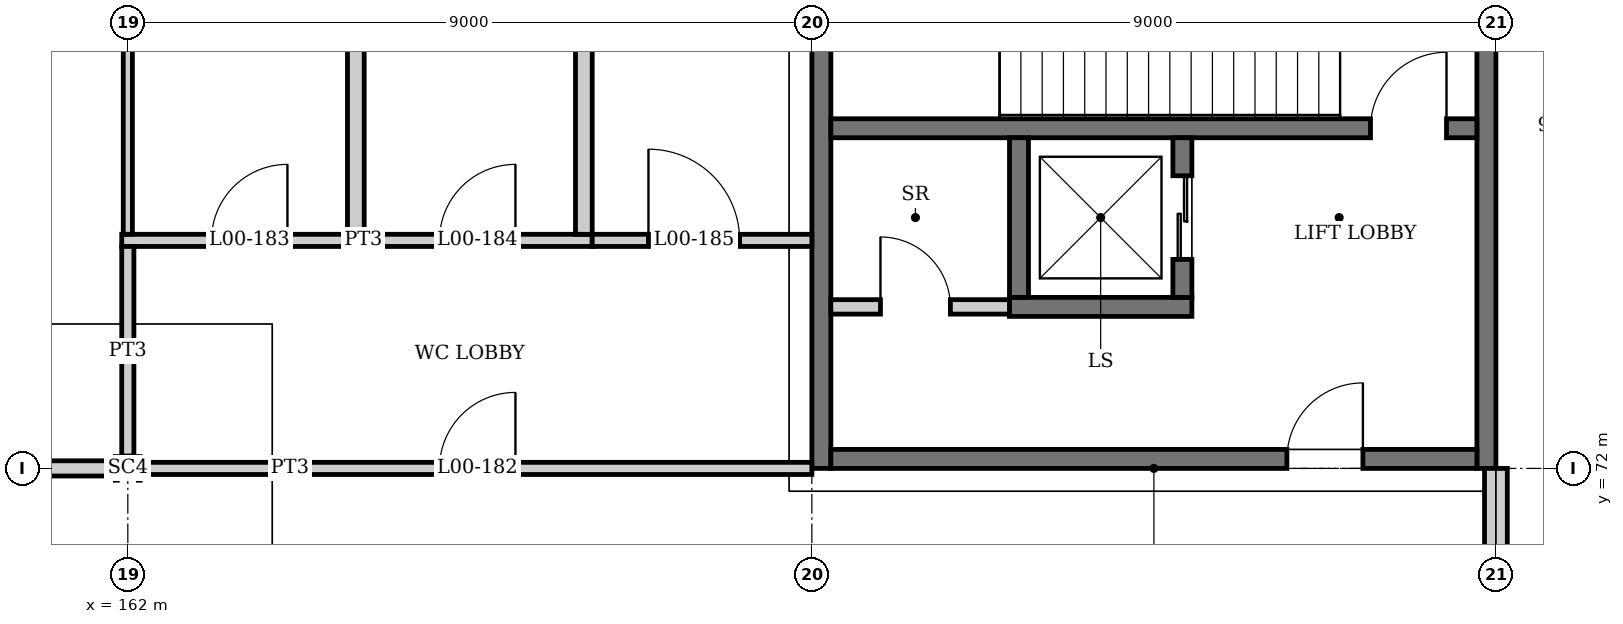
"""IFC4 building model, lengths in metres.
Left out: names, types, materials, properties, quantities, classifications, styles, units other than length and angle.
Written with IfcOpenShell. Run it as: python <this file> out.ifc"""

import sys

from ifc_helpers import new_model, si_unit, direction, frame, frame_2d, origin, origin_2d, place, context, subcontext, project, spatial, rectangle, i_section, extrude, element, fill, save


model = new_model("IFC4")
c1 = context("Model", 3, precision=1e-05, world=origin(), true_north=direction((0.0, 1.0)))
c2 = subcontext(c1, "Body", "Model", "MODEL_VIEW")
j1 = project(units=[si_unit("LENGTHUNIT", "METRE"), si_unit("PLANEANGLEUNIT", "RADIAN")], contexts=[c1])
p1 = place(None, origin())
s1 = spatial("IfcSite", under=j1, at=p1, CompositionType="ELEMENT")
p2 = place(p1, origin())
s2 = spatial("IfcBuilding", under=s1, at=p2, CompositionType="ELEMENT")
p3 = place(p2, origin())
s3 = spatial("IfcBuildingStorey", under=s2, at=p3, CompositionType="ELEMENT", Elevation=0.0)
p4 = place(p3, frame((162.0, 72.0, 0.0), z_axis=(0.0, 0.0, 1.0), x_axis=(0.0, 1.0, 0.0)))
e1 = element("IfcColumn", 1, at=p4, inside=s3, PredefinedType="COLUMN", context=c2, shape_type="SweptSolid", body=[
    extrude(i_section(OverallWidth=0.311, OverallDepth=0.327, WebThickness=0.016, FlangeThickness=0.025, at=origin_2d()), origin(), (0.0, 0.0, 1.0), 6.0),
])
p5 = place(p3, frame((171.125, 72.0, 0.0), z_axis=(0.0, 0.0, 1.0), x_axis=(0.0, 1.0, 0.0)))
e2 = element("IfcWall", 2, at=p5, inside=s3, PredefinedType="SHEAR", context=c2, shape_type="SweptSolid", body=[
    extrude(rectangle(XDim=9.0, YDim=0.25, at=frame_2d((4.5, 0.0))), origin(), (0.0, 0.0, 1.0), 6.0),
])
p6 = place(p3, frame((179.875, 72.0, 0.0), z_axis=(0.0, 0.0, 1.0), x_axis=(0.0, 1.0, 0.0)))
e3 = element("IfcWall", 3, at=p6, inside=s3, PredefinedType="SHEAR", context=c2, shape_type="SweptSolid", body=[
    extrude(rectangle(XDim=9.0, YDim=0.25, at=frame_2d((4.5, 0.0))), origin(), (0.0, 0.0, 1.0), 6.0),
])
p7 = place(p6, frame((5.6, 0.0, 0.0)))
e4 = element("IfcOpeningElement", 4, at=p7, cuts=e3, PredefinedType="OPENING", context=c2, shape_type="SweptSolid", body=[
    extrude(rectangle(XDim=1.8, YDim=2.4, at=frame_2d((0.9, 1.2))), frame((0.0, 0.135, 0.0), z_axis=(0.0, -1.0, 0.0), x_axis=(1.0, 0.0, 0.0)), (0.0, 0.0, 1.0), 0.27),
])
p8 = place(p3, frame((171.25, 72.125, 0.0), z_axis=(0.0, 0.0, 1.0), x_axis=(1.0, 0.0, 0.0)))
e5 = element("IfcWall", 5, at=p8, inside=s3, PredefinedType="SHEAR", context=c2, shape_type="SweptSolid", body=[
    extrude(rectangle(XDim=8.5, YDim=0.25, at=frame_2d((4.25, 0.0))), origin(), (0.0, 0.0, 1.0), 6.0),
])
p9 = place(p8, frame((6.0, 0.0, 0.0)))
e6 = element("IfcOpeningElement", 6, at=p9, cuts=e5, PredefinedType="OPENING", context=c2, shape_type="SweptSolid", body=[
    extrude(rectangle(XDim=1.0, YDim=2.1, at=frame_2d((0.5, 1.05))), frame((0.0, 0.135, 0.0), z_axis=(0.0, -1.0, 0.0), x_axis=(1.0, 0.0, 0.0)), (0.0, 0.0, 1.0), 0.27),
])
p10 = place(p3, frame((180.0, 63.154, 0.0), z_axis=(0.0, 0.0, 1.0), x_axis=(0.0, 1.0, 0.0)))
e7 = element("IfcWall", 7, at=p10, inside=s3, PredefinedType="SOLIDWALL", context=c2, shape_type="SweptSolid", body=[
    extrude(rectangle(XDim=8.846, YDim=0.3, at=frame_2d((4.423, 0.0))), origin(), (0.0, 0.0, 1.0), 5.444),
])
p11 = place(p10, frame((1.046, 0.0, 1.2)))
e8 = element("IfcOpeningElement", 8, at=p11, cuts=e7, PredefinedType="OPENING", context=c2, shape_type="SweptSolid", body=[
    extrude(rectangle(XDim=2.1, YDim=1.2, at=frame_2d((1.05, 0.6))), frame((0.0, 0.16, 0.0), z_axis=(0.0, -1.0, 0.0), x_axis=(1.0, 0.0, 0.0)), (0.0, 0.0, 1.0), 0.32),
])
p12 = place(p10, frame((6.146, 0.0, 0.6)))
e9 = element("IfcOpeningElement", 9, at=p12, cuts=e7, PredefinedType="OPENING", context=c2, shape_type="SweptSolid", body=[
    extrude(rectangle(XDim=0.9, YDim=2.7, at=frame_2d((0.45, 1.35))), frame((0.0, 0.16, 0.0), z_axis=(0.0, -1.0, 0.0), x_axis=(1.0, 0.0, 0.0)), (0.0, 0.0, 1.0), 0.32),
])
p13 = place(p3, frame((179.75, 76.475, 0.0), z_axis=(0.0, 0.0, 1.0), x_axis=(-1.0, 0.0, 0.0)))
e10 = element("IfcWall", 10, at=p13, inside=s3, PredefinedType="SOLIDWALL", context=c2, shape_type="SweptSolid", body=[
    extrude(rectangle(XDim=8.5, YDim=0.25, at=frame_2d((4.25, 0.0))), origin(), (0.0, 0.0, 1.0), 5.75),
])
p14 = place(p13, frame((0.4, 0.0, 0.0)))
e11 = element("IfcOpeningElement", 11, at=p14, cuts=e10, PredefinedType="OPENING", context=c2, shape_type="SweptSolid", body=[
    extrude(rectangle(XDim=1.0, YDim=2.1, at=frame_2d((0.5, 1.05))), frame((0.0, 0.135, 0.0), z_axis=(0.0, -1.0, 0.0), x_axis=(1.0, 0.0, 0.0)), (0.0, 0.0, 1.0), 0.27),
])
p15 = place(p3, frame((173.6, 74.125, -1.4), z_axis=(0.0, 0.0, 1.0), x_axis=(1.0, 0.0, 0.0)))
e12 = element("IfcWall", 12, at=p15, inside=s3, PredefinedType="SOLIDWALL", context=c2, shape_type="SweptSolid", body=[
    extrude(rectangle(XDim=2.4, YDim=0.25, at=frame_2d((1.2, 0.0))), origin(), (0.0, 0.0, 1.0), 7.4),
])
p16 = place(p3, frame((173.725, 74.25, -1.4), z_axis=(0.0, 0.0, 1.0), x_axis=(0.0, 1.0, 0.0)))
e13 = element("IfcWall", 13, at=p16, inside=s3, PredefinedType="SOLIDWALL", context=c2, shape_type="SweptSolid", body=[
    extrude(rectangle(XDim=2.1, YDim=0.25, at=frame_2d((1.05, 0.0))), origin(), (0.0, 0.0, 1.0), 7.4),
])
p17 = place(p3, frame((175.875, 74.25, -1.4), z_axis=(0.0, 0.0, 1.0), x_axis=(0.0, 1.0, 0.0)))
e14 = element("IfcWall", 14, at=p17, inside=s3, PredefinedType="SOLIDWALL", context=c2, shape_type="SweptSolid", body=[
    extrude(rectangle(XDim=2.1, YDim=0.25, at=frame_2d((1.05, 0.0))), origin(), (0.0, 0.0, 1.0), 7.4),
])
p18 = place(p17, frame((0.5, 0.0, 1.4)))
e15 = element("IfcOpeningElement", 15, at=p18, cuts=e14, PredefinedType="OPENING", context=c2, shape_type="SweptSolid", body=[
    extrude(rectangle(XDim=1.1, YDim=2.1, at=frame_2d((0.55, 1.05))), frame((0.0, 0.135, 0.0), z_axis=(0.0, -1.0, 0.0), x_axis=(1.0, 0.0, 0.0)), (0.0, 0.0, 1.0), 0.27),
])
p19 = place(p3, frame((153.164, 72.0, 0.0), z_axis=(0.0, 0.0, 1.0), x_axis=(1.0, 0.0, 0.0)))
e16 = element("IfcWall", 16, at=p19, inside=s3, PredefinedType="PARTITIONING", context=c2, shape_type="SweptSolid", body=[
    extrude(rectangle(XDim=8.673, YDim=0.2, at=frame_2d((4.336, 0.0))), origin(), (0.0, 0.0, 1.0), 5.322),
])
p20 = place(p19, frame((3.937, 0.0, 0.0)))
e17 = element("IfcOpeningElement", 17, at=p20, cuts=e16, PredefinedType="OPENING", context=c2, shape_type="SweptSolid", body=[
    extrude(rectangle(XDim=1.0, YDim=2.1, at=frame_2d((0.5, 1.05))), frame((0.0, 0.11, 0.0), z_axis=(0.0, -1.0, 0.0), x_axis=(1.0, 0.0, 0.0)), (0.0, 0.0, 1.0), 0.22),
])
p21 = place(p3, frame((162.164, 72.0, 0.0), z_axis=(0.0, 0.0, 1.0), x_axis=(1.0, 0.0, 0.0)))
e18 = element("IfcWall", 18, at=p21, inside=s3, PredefinedType="PARTITIONING", context=c2, shape_type="SweptSolid", body=[
    extrude(rectangle(XDim=8.836, YDim=0.16, at=frame_2d((4.418, 0.0))), origin(), (0.0, 0.0, 1.0), 5.322),
])
p22 = place(p21, frame((3.937, 0.0, 0.0)))
e19 = element("IfcOpeningElement", 19, at=p22, cuts=e18, PredefinedType="OPENING", context=c2, shape_type="SweptSolid", body=[
    extrude(rectangle(XDim=1.0, YDim=2.1, at=frame_2d((0.5, 1.05))), frame((0.0, 0.09, 0.0), z_axis=(0.0, -1.0, 0.0), x_axis=(1.0, 0.0, 0.0)), (0.0, 0.0, 1.0), 0.18),
])
p23 = place(p3, frame((171.25, 74.125, 0.0), z_axis=(0.0, 0.0, 1.0), x_axis=(1.0, 0.0, 0.0)))
e20 = element("IfcWall", 20, at=p23, inside=s3, PredefinedType="PARTITIONING", context=c2, shape_type="SweptSolid", body=[
    extrude(rectangle(XDim=2.35, YDim=0.19, at=frame_2d((1.175, 0.0))), origin(), (0.0, 0.0, 1.0), 5.75),
])
p24 = place(p23, frame((0.653, 0.0, 0.0)))
e21 = element("IfcOpeningElement", 21, at=p24, cuts=e20, PredefinedType="OPENING", context=c2, shape_type="SweptSolid", body=[
    extrude(rectangle(XDim=0.92, YDim=2.1, at=frame_2d((0.46, 1.05))), frame((0.0, 0.105, 0.0), z_axis=(0.0, -1.0, 0.0), x_axis=(1.0, 0.0, 0.0)), (0.0, 0.0, 1.0), 0.21),
])
p25 = place(p3, frame((161.92, 75.0, 0.0), z_axis=(0.0, 0.0, 1.0), x_axis=(1.0, 0.0, 0.0)))
e22 = element("IfcWall", 22, at=p25, inside=s3, PredefinedType="PARTITIONING", context=c2, shape_type="SweptSolid", body=[
    extrude(rectangle(XDim=6.19, YDim=0.16, at=frame_2d((3.095, 0.0))), origin(), (0.0, 0.0, 1.0), 5.447),
])
p26 = place(p25, frame((1.18, 0.0, 0.0)))
e23 = element("IfcOpeningElement", 23, at=p26, cuts=e22, PredefinedType="OPENING", context=c2, shape_type="SweptSolid", body=[
    extrude(rectangle(XDim=1.0, YDim=2.1, at=frame_2d((0.5, 1.05))), frame((0.0, 0.09, 0.0), z_axis=(0.0, -1.0, 0.0), x_axis=(1.0, 0.0, 0.0)), (0.0, 0.0, 1.0), 0.18),
])
p27 = place(p25, frame((4.18, 0.0, 0.0)))
e24 = element("IfcOpeningElement", 24, at=p27, cuts=e22, PredefinedType="OPENING", context=c2, shape_type="SweptSolid", body=[
    extrude(rectangle(XDim=1.0, YDim=2.1, at=frame_2d((0.5, 1.05))), frame((0.0, 0.09, 0.0), z_axis=(0.0, -1.0, 0.0), x_axis=(1.0, 0.0, 0.0)), (0.0, 0.0, 1.0), 0.18),
])
p28 = place(p3, frame((168.11, 75.0, 0.0), z_axis=(0.0, 0.0, 1.0), x_axis=(1.0, 0.0, 0.0)))
e25 = element("IfcWall", 25, at=p28, inside=s3, PredefinedType="PARTITIONING", context=c2, shape_type="SweptSolid", body=[
    extrude(rectangle(XDim=2.89, YDim=0.16, at=frame_2d((1.445, 0.0))), origin(), (0.0, 0.0, 1.0), 5.85),
])
p29 = place(p28, frame((0.74, 0.0, 0.0)))
e26 = element("IfcOpeningElement", 26, at=p29, cuts=e25, PredefinedType="OPENING", context=c2, shape_type="SweptSolid", body=[
    extrude(rectangle(XDim=1.2, YDim=2.1, at=frame_2d((0.6, 1.05))), frame((0.0, 0.09, 0.0), z_axis=(0.0, -1.0, 0.0), x_axis=(1.0, 0.0, 0.0)), (0.0, 0.0, 1.0), 0.18),
])
p30 = place(p3, frame((162.0, 72.164, 0.0), z_axis=(0.0, 0.0, 1.0), x_axis=(0.0, 1.0, 0.0)))
e27 = element("IfcWall", 27, at=p30, inside=s3, PredefinedType="PARTITIONING", context=c2, shape_type="SweptSolid", body=[
    extrude(rectangle(XDim=2.756, YDim=0.16, at=frame_2d((1.378, 0.0))), origin(), (0.0, 0.0, 1.0), 5.447),
])
p31 = place(p3, frame((162.0, 75.08, 0.0), z_axis=(0.0, 0.0, 1.0), x_axis=(0.0, 1.0, 0.0)))
e28 = element("IfcWall", 28, at=p31, inside=s3, PredefinedType="PARTITIONING", context=c2, shape_type="SweptSolid", body=[
    extrude(rectangle(XDim=5.32, YDim=0.12, at=frame_2d((2.66, 0.0))), origin(), (0.0, 0.0, 1.0), 5.447),
])
for number, where, z_axis, x_axis in (
    (29, (165.0, 75.08, 0.0), (0.0, 0.0, 1.0), (0.0, 1.0, 0.0)),
    (30, (168.0, 75.08, 0.0), (0.0, 0.0, 1.0), (0.0, 1.0, 0.0)),
):
    element("IfcWall", number, at=place(p3, frame(where, z_axis=z_axis, x_axis=x_axis)), inside=s3, PredefinedType="PLUMBINGWALL", context=c2, shape_type="SweptSolid", body=[
        extrude(rectangle(XDim=5.32, YDim=0.22, at=frame_2d((2.66, 0.0))), origin(), (0.0, 0.0, 1.0), 5.85),
    ])
p32 = place(p18, origin())
e31 = element("IfcDoor", 31, at=p32, inside=s3, OperationType="DOUBLE_DOOR_SLIDING", PredefinedType="DOOR", context=c2, shape_type="SweptSolid", body=[
    extrude(rectangle(XDim=1.1, YDim=2.1, at=frame_2d((0.55, 1.05))), frame((0.0, 0.025, 0.0), z_axis=(0.0, -1.0, 0.0), x_axis=(1.0, 0.0, 0.0)), (0.0, 0.0, 1.0), 0.05),
])
fill(e15, e31)
p33 = place(p14, frame((1.0, 0.0, 0.0), z_axis=(0.0, 0.0, 1.0), x_axis=(-1.0, 0.0, 0.0)))
e32 = element("IfcDoor", 32, at=p33, inside=s3, OperationType="SINGLE_SWING_RIGHT", PredefinedType="DOOR", context=c2, shape_type="SweptSolid", body=[
    extrude(rectangle(XDim=1.0, YDim=2.1, at=frame_2d((0.5, 1.05))), frame((0.0, 0.025, 0.0), z_axis=(0.0, -1.0, 0.0), x_axis=(1.0, 0.0, 0.0)), (0.0, 0.0, 1.0), 0.05),
])
fill(e11, e32)
p34 = place(p9, origin())
e33 = element("IfcDoor", 33, at=p34, inside=s3, OperationType="SINGLE_SWING_RIGHT", PredefinedType="DOOR", context=c2, shape_type="SweptSolid", body=[
    extrude(rectangle(XDim=1.0, YDim=2.1, at=frame_2d((0.5, 1.05))), frame((0.0, 0.025, 0.0), z_axis=(0.0, -1.0, 0.0), x_axis=(1.0, 0.0, 0.0)), (0.0, 0.0, 1.0), 0.05),
])
fill(e6, e33)
p35 = place(p24, origin())
e34 = element("IfcDoor", 34, at=p35, inside=s3, OperationType="SINGLE_SWING_LEFT", PredefinedType="DOOR", context=c2, shape_type="SweptSolid", body=[
    extrude(rectangle(XDim=0.92, YDim=2.1, at=frame_2d((0.46, 1.05))), frame((0.0, 0.025, 0.0), z_axis=(0.0, -1.0, 0.0), x_axis=(1.0, 0.0, 0.0)), (0.0, 0.0, 1.0), 0.05),
])
fill(e21, e34)
p36 = place(p22, origin())
e35 = element("IfcDoor", 35, at=p36, inside=s3, OperationType="SINGLE_SWING_RIGHT", PredefinedType="DOOR", context=c2, shape_type="SweptSolid", body=[
    extrude(rectangle(XDim=1.0, YDim=2.1, at=frame_2d((0.5, 1.05))), frame((0.0, 0.025, 0.0), z_axis=(0.0, -1.0, 0.0), x_axis=(1.0, 0.0, 0.0)), (0.0, 0.0, 1.0), 0.05),
])
fill(e19, e35)
p37 = place(p26, origin())
e36 = element("IfcDoor", 36, at=p37, inside=s3, OperationType="SINGLE_SWING_RIGHT", PredefinedType="DOOR", context=c2, shape_type="SweptSolid", body=[
    extrude(rectangle(XDim=1.0, YDim=2.1, at=frame_2d((0.5, 1.05))), frame((0.0, 0.025, 0.0), z_axis=(0.0, -1.0, 0.0), x_axis=(1.0, 0.0, 0.0)), (0.0, 0.0, 1.0), 0.05),
])
fill(e23, e36)
p38 = place(p27, origin())
e37 = element("IfcDoor", 37, at=p38, inside=s3, OperationType="SINGLE_SWING_RIGHT", PredefinedType="DOOR", context=c2, shape_type="SweptSolid", body=[
    extrude(rectangle(XDim=1.0, YDim=2.1, at=frame_2d((0.5, 1.05))), frame((0.0, 0.025, 0.0), z_axis=(0.0, -1.0, 0.0), x_axis=(1.0, 0.0, 0.0)), (0.0, 0.0, 1.0), 0.05),
])
fill(e24, e37)
p39 = place(p29, origin())
e38 = element("IfcDoor", 38, at=p39, inside=s3, OperationType="SINGLE_SWING_LEFT", PredefinedType="DOOR", context=c2, shape_type="SweptSolid", body=[
    extrude(rectangle(XDim=1.2, YDim=2.1, at=frame_2d((0.6, 1.05))), frame((0.0, 0.025, 0.0), z_axis=(0.0, -1.0, 0.0), x_axis=(1.0, 0.0, 0.0)), (0.0, 0.0, 1.0), 0.05),
])
fill(e26, e38)
save(model, sys.argv[1])
